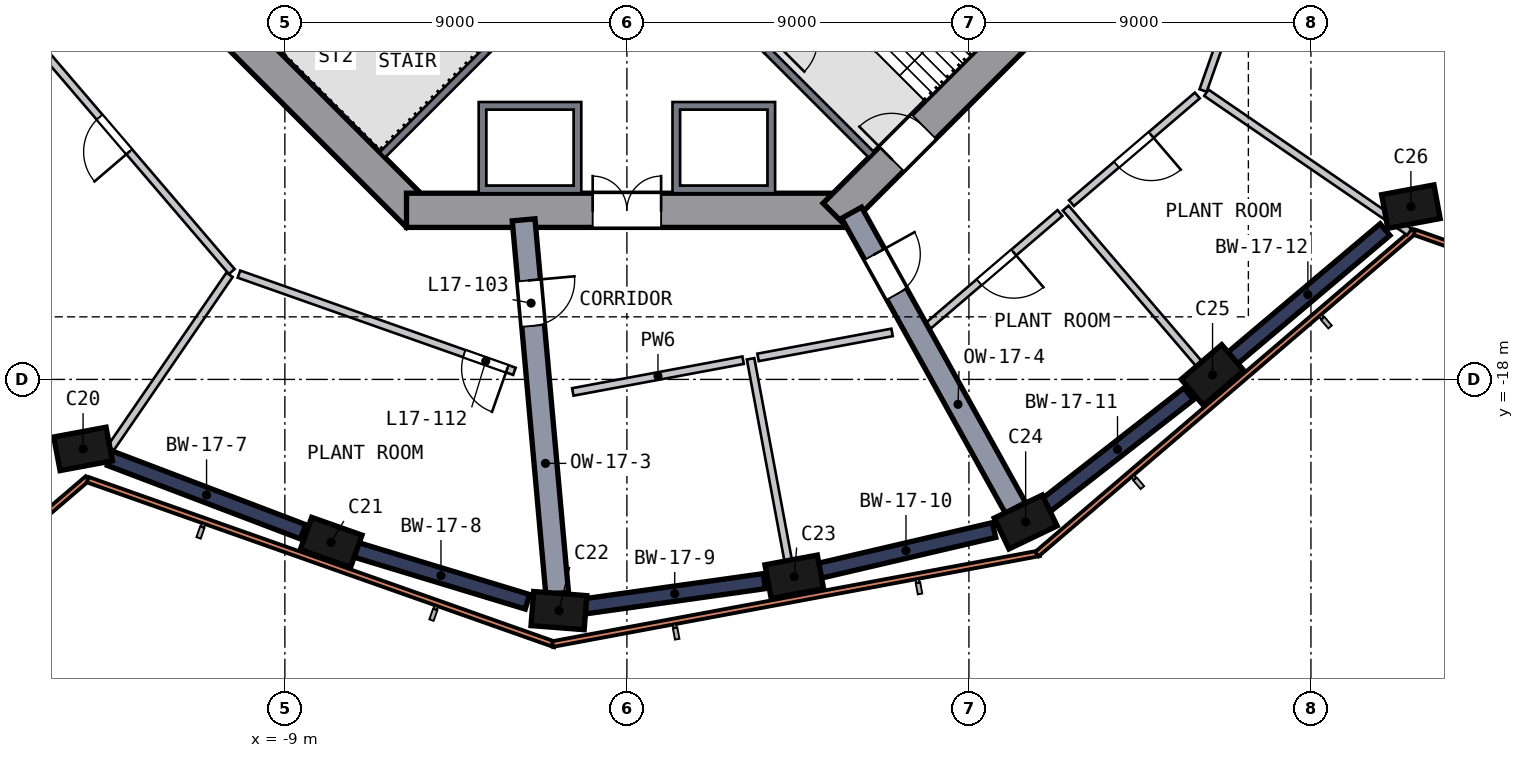
"""IFC4 building model, lengths in metres.
Left out: names, types, materials, properties, quantities, classifications, styles, units other than length and angle.
Written with IfcOpenShell. Run it as: python <this file> out.ifc"""

import sys

from ifc_helpers import new_model, si_unit, direction, frame, frame_2d, origin, origin_2d, place, context, subcontext, project, spatial, polyline, rectangle, outline, extrude, element, fill, save


model = new_model("IFC4")
c1 = context("Model", 3, precision=1e-05, world=origin(), true_north=direction((0.0, 1.0)))
c2 = subcontext(c1, "Body", "Model", "MODEL_VIEW")
j1 = project(units=[si_unit("LENGTHUNIT", "METRE"), si_unit("PLANEANGLEUNIT", "RADIAN")], contexts=[c1])
p1 = place(None, origin())
s1 = spatial("IfcSite", under=j1, at=p1, CompositionType="ELEMENT")
p2 = place(p1, origin())
s2 = spatial("IfcBuilding", under=s1, at=p2, CompositionType="ELEMENT")
p3 = place(p2, frame((0.0, 0.0, 75.0)))
s3 = spatial("IfcBuildingStorey", under=s2, at=p3, CompositionType="ELEMENT", Elevation=75.0)
p4 = place(p3, frame((-14.377, -19.781, 0.0), z_axis=(0.055480543, -0.039567099, 0.997675475), x_axis=(-0.981430736, -0.185918026, 0.047203799)))
e1 = element("IfcColumn", 1, at=p4, inside=s3, PredefinedType="COLUMN", context=c2, shape_type="SweptSolid", body=[
    extrude(rectangle(XDim=1.4, YDim=0.9, at=origin_2d()), origin(), (0.0, 0.0, 1.0), 4.51),
])
p5 = place(p3, frame((-7.857, -22.262, 0.0), z_axis=(0.062256172, -0.021383642, 0.997831102), x_axis=(0.940953962, -0.332073569, -0.0658239)))
e2 = element("IfcColumn", 2, at=p5, inside=s3, PredefinedType="COLUMN", context=c2, shape_type="SweptSolid", body=[
    extrude(rectangle(XDim=1.4, YDim=0.9, at=origin_2d()), origin(), (0.0, 0.0, 1.0), 4.51),
])
p6 = place(p3, frame((-1.87, -24.079, 0.0), z_axis=(0.067121874, -0.004601096, 0.997734175), x_axis=(-0.994788965, 0.076607564, 0.067277016)))
e3 = element("IfcColumn", 3, at=p6, inside=s3, PredefinedType="COLUMN", context=c2, shape_type="SweptSolid", body=[
    extrude(rectangle(XDim=1.4, YDim=0.9, at=origin_2d()), origin(), (0.0, 0.0, 1.0), 4.51),
])
p7 = place(p3, frame((4.327, -23.208, 0.0), z_axis=(0.064584105, 0.01261366, 0.997832546), x_axis=(0.980904037, 0.18302285, -0.06580202)))
e4 = element("IfcColumn", 4, at=p7, inside=s3, PredefinedType="COLUMN", context=c2, shape_type="SweptSolid", body=[
    extrude(rectangle(XDim=1.4, YDim=0.9, at=origin_2d()), origin(), (0.0, 0.0, 1.0), 4.51),
])
p8 = place(p3, frame((10.42, -21.788, 0.0), z_axis=(0.06046373, 0.029555234, 0.997732743), x_axis=(-0.900031459, -0.430597628, 0.067298255)))
e5 = element("IfcColumn", 5, at=p8, inside=s3, PredefinedType="COLUMN", context=c2, shape_type="SweptSolid", body=[
    extrude(rectangle(XDim=1.4, YDim=0.9, at=origin_2d()), origin(), (0.0, 0.0, 1.0), 4.51),
])
p9 = place(p3, frame((15.351, -17.936, 0.0), z_axis=(0.049588704, 0.043146504, 0.997837331), x_axis=(0.758262845, 0.64862709, -0.065729414)))
e6 = element("IfcColumn", 6, at=p9, inside=s3, PredefinedType="COLUMN", context=c2, shape_type="SweptSolid", body=[
    extrude(rectangle(XDim=1.4, YDim=0.9, at=origin_2d()), origin(), (0.0, 0.0, 1.0), 4.51),
])
p10 = place(p3, frame((20.585, -13.522, 0.0), z_axis=(0.037130289, 0.057643962, 0.997646488), x_axis=(-0.982298041, -0.18132342, 0.04703591)))
e7 = element("IfcColumn", 7, at=p10, inside=s3, PredefinedType="COLUMN", context=c2, shape_type="SweptSolid", body=[
    extrude(rectangle(XDim=1.4, YDim=0.9, at=origin_2d()), origin(), (0.0, 0.0, 1.0), 4.51),
])
p11 = place(p3, frame((-13.682, -5.481, 0.0), z_axis=(0.0, 0.0, 1.0), x_axis=(0.707106781, -0.707106781, 0.0)))
e8 = element("IfcWall", 8, at=p11, inside=s3, PredefinedType="SHEAR", context=c2, shape_type="SweptSolid", body=[
    extrude(rectangle(XDim=11.598, YDim=0.9, at=frame_2d((5.799, 0.0))), origin(), (0.0, 0.0, 1.0), 6.0),
])
p12 = place(p11, frame((2.099, 0.0, 0.0)))
e9 = element("IfcOpeningElement", 9, at=p12, cuts=e8, PredefinedType="OPENING", context=c2, shape_type="SweptSolid", body=[
    extrude(rectangle(XDim=1.2, YDim=2.1, at=frame_2d((0.6, 1.05))), frame((0.0, 0.46, 0.0), z_axis=(0.0, -1.0, 0.0), x_axis=(1.0, 0.0, 0.0)), (0.0, 0.0, 1.0), 0.92),
])
p13 = place(p3, frame((-5.799, -13.55, 0.0), z_axis=(0.0, 0.0, 1.0), x_axis=(1.0, 0.0, 0.0)))
e10 = element("IfcWall", 10, at=p13, inside=s3, PredefinedType="SHEAR", context=c2, shape_type="SweptSolid", body=[
    extrude(rectangle(XDim=11.598, YDim=0.9, at=frame_2d((5.799, 0.0))), origin(), (0.0, 0.0, 1.0), 6.0),
])
p14 = place(p13, frame((4.899, 0.0, 0.0)))
e11 = element("IfcOpeningElement", 11, at=p14, cuts=e10, PredefinedType="OPENING", context=c2, shape_type="SweptSolid", body=[
    extrude(rectangle(XDim=1.8, YDim=2.1, at=frame_2d((0.9, 1.05))), frame((0.0, 0.46, 0.0), z_axis=(0.0, -1.0, 0.0), x_axis=(1.0, 0.0, 0.0)), (0.0, 0.0, 1.0), 0.92),
])
p15 = place(p3, frame((5.481, -13.682, 0.0), z_axis=(0.0, 0.0, 1.0), x_axis=(0.707106781, 0.707106781, 0.0)))
e12 = element("IfcWall", 12, at=p15, inside=s3, PredefinedType="SHEAR", context=c2, shape_type="SweptSolid", body=[
    extrude(rectangle(XDim=11.598, YDim=0.9, at=frame_2d((5.799, 0.0))), origin(), (0.0, 0.0, 1.0), 6.0),
])
p16 = place(p15, frame((2.099, 0.0, 0.0)))
e13 = element("IfcOpeningElement", 13, at=p16, cuts=e12, PredefinedType="OPENING", context=c2, shape_type="SweptSolid", body=[
    extrude(rectangle(XDim=1.2, YDim=2.1, at=frame_2d((0.6, 1.05))), frame((0.0, 0.46, 0.0), z_axis=(0.0, -1.0, 0.0), x_axis=(1.0, 0.0, 0.0)), (0.0, 0.0, 1.0), 0.92),
])
p17 = place(p3, frame((-13.599, -20.077, 0.0), z_axis=(0.0, 0.0, 1.0), x_axis=(0.934607989, -0.3556795, 0.0)))
e14 = element("IfcWall", 14, at=p17, inside=s3, PredefinedType="SHEAR", context=c2, shape_type="SweptSolid", body=[
    extrude(rectangle(XDim=5.433, YDim=0.4, at=frame_2d((2.716, 0.0))), origin(), (0.0, 0.0, 1.0), 4.5),
])
p18 = place(p3, frame((-7.169, -22.471, 0.0), z_axis=(0.0, 0.0, 1.0), x_axis=(0.956933288, -0.290307911, 0.0)))
e15 = element("IfcWall", 15, at=p18, inside=s3, PredefinedType="SHEAR", context=c2, shape_type="SweptSolid", body=[
    extrude(rectangle(XDim=4.757, YDim=0.4, at=frame_2d((2.379, 0.0))), origin(), (0.0, 0.0, 1.0), 4.5),
])
p19 = place(p3, frame((-1.097, -23.97, 0.0), z_axis=(0.0, 0.0, 1.0), x_axis=(0.99028034, 0.139085759, 0.0)))
e16 = element("IfcWall", 16, at=p19, inside=s3, PredefinedType="SHEAR", context=c2, shape_type="SweptSolid", body=[
    extrude(rectangle(XDim=4.757, YDim=0.4, at=frame_2d((2.378, 0.0))), origin(), (0.0, 0.0, 1.0), 4.5),
])
p20 = place(p3, frame((5.027, -23.045, 0.0), z_axis=(0.0, 0.0, 1.0), x_axis=(0.973874889, 0.227085229, 0.0)))
e17 = element("IfcWall", 17, at=p20, inside=s3, PredefinedType="SHEAR", context=c2, shape_type="SweptSolid", body=[
    extrude(rectangle(XDim=4.757, YDim=0.4, at=frame_2d((2.379, 0.0))), origin(), (0.0, 0.0, 1.0), 4.5),
])
p21 = place(p3, frame((11.035, -21.307, 0.0), z_axis=(0.0, 0.0, 1.0), x_axis=(0.788051606, 0.615609183, 0.0)))
e18 = element("IfcWall", 18, at=p21, inside=s3, PredefinedType="SHEAR", context=c2, shape_type="SweptSolid", body=[
    extrude(rectangle(XDim=4.757, YDim=0.4, at=frame_2d((2.378, 0.0))), origin(), (0.0, 0.0, 1.0), 4.5),
])
p22 = place(p3, frame((15.889, -17.482, 0.0), z_axis=(0.0, 0.0, 1.0), x_axis=(0.764448601, 0.64468468, 0.0)))
e19 = element("IfcWall", 19, at=p22, inside=s3, PredefinedType="SHEAR", context=c2, shape_type="SweptSolid", body=[
    extrude(rectangle(XDim=5.312, YDim=0.4, at=frame_2d((2.656, 0.0))), origin(), (0.0, 0.0, 1.0), 4.5),
])
p23 = place(p3, frame((-2.718, -13.801, 0.0), z_axis=(0.0, 0.0, 1.0), x_axis=(0.089502977, -0.995986555, 0.0)))
e20 = element("IfcWall", 20, at=p23, inside=s3, PredefinedType="SHEAR", context=c2, shape_type="SweptSolid", body=[
    extrude(rectangle(XDim=9.869, YDim=0.6, at=frame_2d((4.935, 0.0))), origin(), (0.0, 0.0, 1.0), 4.5),
])
p24 = place(p23, frame((1.6, 0.0, 0.0)))
e21 = element("IfcOpeningElement", 21, at=p24, cuts=e20, PredefinedType="OPENING", context=c2, shape_type="SweptSolid", body=[
    extrude(rectangle(XDim=1.2, YDim=2.1, at=frame_2d((0.6, 1.05))), frame((0.0, 0.31, 0.0), z_axis=(0.0, -1.0, 0.0), x_axis=(1.0, 0.0, 0.0)), (0.0, 0.0, 1.0), 0.62),
])
p25 = place(p3, frame((5.913, -13.614, 0.0), z_axis=(0.0, 0.0, 1.0), x_axis=(0.485409605, -0.874286861, 0.0)))
e22 = element("IfcWall", 22, at=p25, inside=s3, PredefinedType="SHEAR", context=c2, shape_type="SweptSolid", body=[
    extrude(rectangle(XDim=8.885, YDim=0.6, at=frame_2d((4.442, 0.0))), origin(), (0.0, 0.0, 1.0), 4.5),
])
p26 = place(p25, frame((1.25, 0.0, 0.0)))
e23 = element("IfcOpeningElement", 23, at=p26, cuts=e22, PredefinedType="OPENING", context=c2, shape_type="SweptSolid", body=[
    extrude(rectangle(XDim=1.2, YDim=2.1, at=frame_2d((0.6, 1.05))), frame((0.0, 0.31, 0.0), z_axis=(0.0, -1.0, 0.0), x_axis=(1.0, 0.0, 0.0)), (0.0, 0.0, 1.0), 0.62),
])
p27 = place(p3, frame((-20.611, -26.098, 0.0), z_axis=(0.0, 0.0, 1.0), x_axis=(0.759711486, 0.650260301, 0.0)))
e24 = element("IfcWall", 24, at=p27, inside=s3, PredefinedType="SOLIDWALL", context=c2, shape_type="SweptSolid", body=[
    extrude(rectangle(XDim=8.445, YDim=0.15, at=frame_2d((4.223, 0.0))), origin(), (0.0, 0.0, 1.0), 4.5),
])
p28 = place(p3, frame((-14.189, -20.637, 0.0), z_axis=(0.0, 0.0, 1.0), x_axis=(0.942990679, -0.332819139, 0.0)))
e25 = element("IfcWall", 25, at=p28, inside=s3, PredefinedType="SOLIDWALL", context=c2, shape_type="SweptSolid", body=[
    extrude(rectangle(XDim=13.046, YDim=0.15, at=frame_2d((6.523, 0.0))), origin(), (0.0, 0.0, 1.0), 4.5),
])
p29 = place(p3, frame((-1.958, -24.965, 0.0), z_axis=(0.0, 0.0, 1.0), x_axis=(0.983062701, 0.183269544, 0.0)))
e26 = element("IfcWall", 26, at=p29, inside=s3, PredefinedType="SOLIDWALL", context=c2, shape_type="SweptSolid", body=[
    extrude(rectangle(XDim=13.035, YDim=0.15, at=frame_2d((6.518, 0.0))), origin(), (0.0, 0.0, 1.0), 4.5),
])
p30 = place(p3, frame((10.787, -22.599, 0.0), z_axis=(0.0, 0.0, 1.0), x_axis=(0.759722997, 0.650246851, 0.0)))
e27 = element("IfcWall", 27, at=p30, inside=s3, PredefinedType="SOLIDWALL", context=c2, shape_type="SweptSolid", body=[
    extrude(rectangle(XDim=13.075, YDim=0.15, at=frame_2d((6.538, 0.0))), origin(), (0.0, 0.0, 1.0), 4.5),
])
p31 = place(p3, frame((20.726, -14.128, 0.0), z_axis=(0.0, 0.0, 1.0), x_axis=(0.942988163, -0.332826267, 0.0)))
e28 = element("IfcWall", 28, at=p31, inside=s3, PredefinedType="SOLIDWALL", context=c2, shape_type="SweptSolid", body=[
    extrude(rectangle(XDim=8.307, YDim=0.15, at=frame_2d((4.153, 0.0))), origin(), (0.0, 0.0, 1.0), 4.5),
])
p32 = place(p3, origin())
e29 = element("IfcWall", 29, at=p32, inside=s3, PredefinedType="SOLIDWALL", context=c2, shape_type="SweptSolid", body=[
    extrude(outline(polyline([(-1.2, -13.1), (-3.9, -13.1), (-3.9, -10.7), (-1.2, -10.7), (-1.2, -13.1)]), holes=[polyline([(-3.7, -10.9), (-3.7, -12.9), (-1.4, -12.9), (-1.4, -10.9), (-3.7, -10.9)])]), origin(), (0.0, 0.0, 1.0), 5.55),
])
p33 = place(p3, origin())
e30 = element("IfcWall", 30, at=p33, inside=s3, PredefinedType="SOLIDWALL", context=c2, shape_type="SweptSolid", body=[
    extrude(outline(polyline([(3.9, -10.7), (3.9, -13.1), (1.2, -13.1), (1.2, -10.7), (3.9, -10.7)]), holes=[polyline([(1.4, -12.9), (3.7, -12.9), (3.7, -10.9), (1.4, -10.9), (1.4, -12.9)])]), origin(), (0.0, 0.0, 1.0), 5.55),
])
p34 = place(p3, frame((-3.535, -9.334, 0.0), z_axis=(0.0, 0.0, 1.0), x_axis=(-0.707106781, 0.707106781, 0.0)))
e31 = element("IfcWall", 31, at=p34, inside=s3, PredefinedType="SOLIDWALL", context=c2, shape_type="SweptSolid", body=[
    extrude(rectangle(XDim=8.2, YDim=0.2, at=frame_2d((4.1, 0.0))), origin(), (0.0, 0.0, 1.0), 5.55),
])
p35 = place(p34, frame((6.6, 0.0, 0.0)))
e32 = element("IfcOpeningElement", 32, at=p35, cuts=e31, PredefinedType="OPENING", context=c2, shape_type="SweptSolid", body=[
    extrude(rectangle(XDim=1.2, YDim=2.1, at=frame_2d((0.6, 1.05))), frame((0.0, 0.11, 0.0), z_axis=(0.0, -1.0, 0.0), x_axis=(1.0, 0.0, 0.0)), (0.0, 0.0, 1.0), 0.22),
])
p36 = place(p3, frame((-3.677, -9.334, 0.0), z_axis=(0.0, 0.0, 1.0), x_axis=(-0.707106781, -0.707106781, 0.0)))
e33 = element("IfcWall", 33, at=p36, inside=s3, PredefinedType="SOLIDWALL", context=c2, shape_type="SweptSolid", body=[
    extrude(rectangle(XDim=3.9, YDim=0.2, at=frame_2d((1.95, 0.0))), origin(), (0.0, 0.0, 1.0), 5.55),
])
p37 = place(p3, frame((9.334, -3.535, 0.0), z_axis=(0.0, 0.0, 1.0), x_axis=(-0.707106781, -0.707106781, 0.0)))
e34 = element("IfcWall", 34, at=p37, inside=s3, PredefinedType="SOLIDWALL", context=c2, shape_type="SweptSolid", body=[
    extrude(rectangle(XDim=8.2, YDim=0.2, at=frame_2d((4.1, 0.0))), origin(), (0.0, 0.0, 1.0), 5.55),
])
p38 = place(p37, frame((6.6, 0.0, 0.0)))
e35 = element("IfcOpeningElement", 35, at=p38, cuts=e34, PredefinedType="OPENING", context=c2, shape_type="SweptSolid", body=[
    extrude(rectangle(XDim=1.2, YDim=2.1, at=frame_2d((0.6, 1.05))), frame((0.0, 0.11, 0.0), z_axis=(0.0, -1.0, 0.0), x_axis=(1.0, 0.0, 0.0)), (0.0, 0.0, 1.0), 0.22),
])
p39 = place(p3, frame((3.677, -9.334, 0.0), z_axis=(0.0, 0.0, 1.0), x_axis=(0.707106781, -0.707106781, 0.0)))
e36 = element("IfcWall", 36, at=p39, inside=s3, PredefinedType="SOLIDWALL", context=c2, shape_type="SweptSolid", body=[
    extrude(rectangle(XDim=3.9, YDim=0.2, at=frame_2d((1.95, 0.0))), origin(), (0.0, 0.0, 1.0), 5.55),
])
p40 = place(p3, frame((-10.397, -15.162, 0.0), z_axis=(0.0, 0.0, 1.0), x_axis=(-0.650250342, 0.75972001, 0.0)))
e37 = element("IfcWall", 37, at=p40, inside=s3, PredefinedType="SOLIDWALL", context=c2, shape_type="SweptSolid", body=[
    extrude(rectangle(XDim=9.516, YDim=0.2, at=frame_2d((4.758, 0.0))), origin(), (0.0, 0.0, 1.0), 4.5),
])
p41 = place(p40, frame((4.15, 0.0, 0.0)))
e38 = element("IfcOpeningElement", 38, at=p41, cuts=e37, PredefinedType="OPENING", context=c2, shape_type="SweptSolid", body=[
    extrude(rectangle(XDim=1.2, YDim=2.1, at=frame_2d((0.6, 1.05))), frame((0.0, 0.11, 0.0), z_axis=(0.0, -1.0, 0.0), x_axis=(1.0, 0.0, 0.0)), (0.0, 0.0, 1.0), 0.22),
])
p42 = place(p3, frame((-10.456, -15.248, 0.0), z_axis=(0.0, 0.0, 1.0), x_axis=(-0.565562702, -0.824705299, 0.0)))
e39 = element("IfcWall", 39, at=p42, inside=s3, PredefinedType="SOLIDWALL", context=c2, shape_type="SweptSolid", body=[
    extrude(rectangle(XDim=5.525, YDim=0.2, at=frame_2d((2.763, 0.0))), origin(), (0.0, 0.0, 1.0), 4.5),
])
p43 = place(p3, frame((-2.96, -17.787, 0.0), z_axis=(0.0, 0.0, 1.0), x_axis=(-0.942995025, 0.332806826, 0.0)))
e40 = element("IfcWall", 40, at=p43, inside=s3, PredefinedType="SOLIDWALL", context=c2, shape_type="SweptSolid", body=[
    extrude(rectangle(XDim=7.687, YDim=0.2, at=frame_2d((3.843, 0.0))), origin(), (0.0, 0.0, 1.0), 4.5),
])
p44 = place(p43, frame((0.2, 0.0, 0.0)))
e41 = element("IfcOpeningElement", 41, at=p44, cuts=e40, PredefinedType="OPENING", context=c2, shape_type="SweptSolid", body=[
    extrude(rectangle(XDim=1.2, YDim=2.1, at=frame_2d((0.6, 1.05))), frame((0.0, 0.11, 0.0), z_axis=(0.0, -1.0, 0.0), x_axis=(1.0, 0.0, 0.0)), (0.0, 0.0, 1.0), 0.22),
])
p45 = place(p3, frame((-1.423, -18.33, 0.0), z_axis=(0.0, 0.0, 1.0), x_axis=(0.983056045, 0.183305241, 0.0)))
e42 = element("IfcWall", 42, at=p45, inside=s3, PredefinedType="SOLIDWALL", context=c2, shape_type="SweptSolid", body=[
    extrude(rectangle(XDim=4.558, YDim=0.2, at=frame_2d((2.279, 0.0))), origin(), (0.0, 0.0, 1.0), 4.5),
])
p46 = place(p3, frame((3.254, -17.458, 0.0), z_axis=(0.0, 0.0, 1.0), x_axis=(0.18327865, -0.983061003, 0.0)))
e43 = element("IfcWall", 43, at=p46, inside=s3, PredefinedType="SOLIDWALL", context=c2, shape_type="SweptSolid", body=[
    extrude(rectangle(XDim=6.35, YDim=0.2, at=frame_2d((3.175, 0.0))), origin(), (0.0, 0.0, 1.0), 4.5),
])
p47 = place(p3, frame((3.451, -17.421, 0.0), z_axis=(0.0, 0.0, 1.0), x_axis=(0.983061962, 0.183273511, 0.0)))
e44 = element("IfcWall", 44, at=p47, inside=s3, PredefinedType="SOLIDWALL", context=c2, shape_type="SweptSolid", body=[
    extrude(rectangle(XDim=3.587, YDim=0.2, at=frame_2d((1.794, 0.0))), origin(), (0.0, 0.0, 1.0), 4.5),
])
p48 = place(p3, frame((11.395, -13.622, 0.0), z_axis=(0.0, 0.0, 1.0), x_axis=(-0.759729045, -0.650239785, 0.0)))
e45 = element("IfcWall", 45, at=p48, inside=s3, PredefinedType="SOLIDWALL", context=c2, shape_type="SweptSolid", body=[
    extrude(rectangle(XDim=4.558, YDim=0.2, at=frame_2d((2.279, 0.0))), origin(), (0.0, 0.0, 1.0), 4.5),
])
p49 = place(p48, frame((1.6, 0.0, 0.0)))
e46 = element("IfcOpeningElement", 46, at=p49, cuts=e45, PredefinedType="OPENING", context=c2, shape_type="SweptSolid", body=[
    extrude(rectangle(XDim=1.2, YDim=2.1, at=frame_2d((0.6, 1.05))), frame((0.0, 0.11, 0.0), z_axis=(0.0, -1.0, 0.0), x_axis=(1.0, 0.0, 0.0)), (0.0, 0.0, 1.0), 0.22),
])
p50 = place(p3, frame((15.01, -10.528, 0.0), z_axis=(0.0, 0.0, 1.0), x_axis=(-0.759742775, -0.650223742, 0.0)))
e47 = element("IfcWall", 47, at=p50, inside=s3, PredefinedType="SOLIDWALL", context=c2, shape_type="SweptSolid", body=[
    extrude(rectangle(XDim=4.358, YDim=0.2, at=frame_2d((2.179, 0.0))), origin(), (0.0, 0.0, 1.0), 4.5),
])
p51 = place(p50, frame((1.6, 0.0, 0.0)))
e48 = element("IfcOpeningElement", 48, at=p51, cuts=e47, PredefinedType="OPENING", context=c2, shape_type="SweptSolid", body=[
    extrude(rectangle(XDim=1.2, YDim=2.1, at=frame_2d((0.6, 1.05))), frame((0.0, 0.11, 0.0), z_axis=(0.0, -1.0, 0.0), x_axis=(1.0, 0.0, 0.0)), (0.0, 0.0, 1.0), 0.22),
])
p52 = place(p3, frame((11.547, -13.491, 0.0), z_axis=(0.0, 0.0, 1.0), x_axis=(0.650233927, -0.759734059, 0.0)))
e49 = element("IfcWall", 49, at=p52, inside=s3, PredefinedType="SOLIDWALL", context=c2, shape_type="SweptSolid", body=[
    extrude(rectangle(XDim=6.35, YDim=0.2, at=frame_2d((3.175, 0.0))), origin(), (0.0, 0.0, 1.0), 4.5),
])
p53 = place(p3, frame((18.33, -1.423, 0.0), z_axis=(0.0, 0.0, 1.0), x_axis=(-0.332818776, -0.942990807, 0.0)))
e50 = element("IfcWall", 50, at=p53, inside=s3, PredefinedType="SOLIDWALL", context=c2, shape_type="SweptSolid", body=[
    extrude(rectangle(XDim=9.516, YDim=0.2, at=frame_2d((4.758, 0.0))), origin(), (0.0, 0.0, 1.0), 4.5),
])
p54 = place(p53, frame((4.15, 0.0, 0.0)))
e51 = element("IfcOpeningElement", 51, at=p54, cuts=e50, PredefinedType="OPENING", context=c2, shape_type="SweptSolid", body=[
    extrude(rectangle(XDim=1.2, YDim=2.1, at=frame_2d((0.6, 1.05))), frame((0.0, 0.11, 0.0), z_axis=(0.0, -1.0, 0.0), x_axis=(1.0, 0.0, 0.0)), (0.0, 0.0, 1.0), 0.22),
])
p55 = place(p3, frame((15.248, -10.456, 0.0), z_axis=(0.0, 0.0, 1.0), x_axis=(0.824728852, -0.565528356, 0.0)))
e52 = element("IfcWall", 52, at=p55, inside=s3, PredefinedType="SOLIDWALL", context=c2, shape_type="SweptSolid", body=[
    extrude(rectangle(XDim=6.476, YDim=0.2, at=frame_2d((3.238, 0.0))), origin(), (0.0, 0.0, 1.0), 4.5),
])
p56 = place(p14, origin())
e53 = element("IfcDoor", 53, at=p56, inside=s3, OperationType="DOUBLE_DOOR_SINGLE_SWING", PredefinedType="DOOR", context=c2, shape_type="SweptSolid", body=[
    extrude(rectangle(XDim=1.8, YDim=2.1, at=frame_2d((0.9, 1.05))), frame((0.0, 0.025, 0.0), z_axis=(0.0, -1.0, 0.0), x_axis=(1.0, 0.0, 0.0)), (0.0, 0.0, 1.0), 0.05),
])
fill(e11, e53)
p57 = place(p16, origin())
e54 = element("IfcDoor", 54, at=p57, inside=s3, OperationType="SINGLE_SWING_LEFT", PredefinedType="DOOR", context=c2, shape_type="SweptSolid", body=[
    extrude(rectangle(XDim=1.2, YDim=2.1, at=frame_2d((0.6, 1.05))), frame((0.0, 0.025, 0.0), z_axis=(0.0, -1.0, 0.0), x_axis=(1.0, 0.0, 0.0)), (0.0, 0.0, 1.0), 0.05),
])
fill(e13, e54)
p58 = place(p24, origin())
e55 = element("IfcDoor", 55, at=p58, inside=s3, OperationType="SINGLE_SWING_LEFT", PredefinedType="DOOR", context=c2, shape_type="SweptSolid", body=[
    extrude(rectangle(XDim=1.2, YDim=2.1, at=frame_2d((0.6, 1.05))), frame((0.0, 0.025, 0.0), z_axis=(0.0, -1.0, 0.0), x_axis=(1.0, 0.0, 0.0)), (0.0, 0.0, 1.0), 0.05),
])
fill(e21, e55)
p59 = place(p26, origin())
e56 = element("IfcDoor", 56, at=p59, inside=s3, OperationType="SINGLE_SWING_LEFT", PredefinedType="DOOR", context=c2, shape_type="SweptSolid", body=[
    extrude(rectangle(XDim=1.2, YDim=2.1, at=frame_2d((0.6, 1.05))), frame((0.0, 0.025, 0.0), z_axis=(0.0, -1.0, 0.0), x_axis=(1.0, 0.0, 0.0)), (0.0, 0.0, 1.0), 0.05),
])
fill(e23, e56)
p60 = place(p41, origin())
e57 = element("IfcDoor", 57, at=p60, inside=s3, OperationType="SINGLE_SWING_LEFT", PredefinedType="DOOR", context=c2, shape_type="SweptSolid", body=[
    extrude(rectangle(XDim=1.2, YDim=2.1, at=frame_2d((0.6, 1.05))), frame((0.0, 0.025, 0.0), z_axis=(0.0, -1.0, 0.0), x_axis=(1.0, 0.0, 0.0)), (0.0, 0.0, 1.0), 0.05),
])
fill(e38, e57)
p61 = place(p44, origin())
e58 = element("IfcDoor", 58, at=p61, inside=s3, OperationType="SINGLE_SWING_LEFT", PredefinedType="DOOR", context=c2, shape_type="SweptSolid", body=[
    extrude(rectangle(XDim=1.2, YDim=2.1, at=frame_2d((0.6, 1.05))), frame((0.0, 0.025, 0.0), z_axis=(0.0, -1.0, 0.0), x_axis=(1.0, 0.0, 0.0)), (0.0, 0.0, 1.0), 0.05),
])
fill(e41, e58)
p62 = place(p49, origin())
e59 = element("IfcDoor", 59, at=p62, inside=s3, OperationType="SINGLE_SWING_LEFT", PredefinedType="DOOR", context=c2, shape_type="SweptSolid", body=[
    extrude(rectangle(XDim=1.2, YDim=2.1, at=frame_2d((0.6, 1.05))), frame((0.0, 0.025, 0.0), z_axis=(0.0, -1.0, 0.0), x_axis=(1.0, 0.0, 0.0)), (0.0, 0.0, 1.0), 0.05),
])
fill(e46, e59)
p63 = place(p51, origin())
e60 = element("IfcDoor", 60, at=p63, inside=s3, OperationType="SINGLE_SWING_LEFT", PredefinedType="DOOR", context=c2, shape_type="SweptSolid", body=[
    extrude(rectangle(XDim=1.2, YDim=2.1, at=frame_2d((0.6, 1.05))), frame((0.0, 0.025, 0.0), z_axis=(0.0, -1.0, 0.0), x_axis=(1.0, 0.0, 0.0)), (0.0, 0.0, 1.0), 0.05),
])
fill(e48, e60)
save(model, sys.argv[1])
